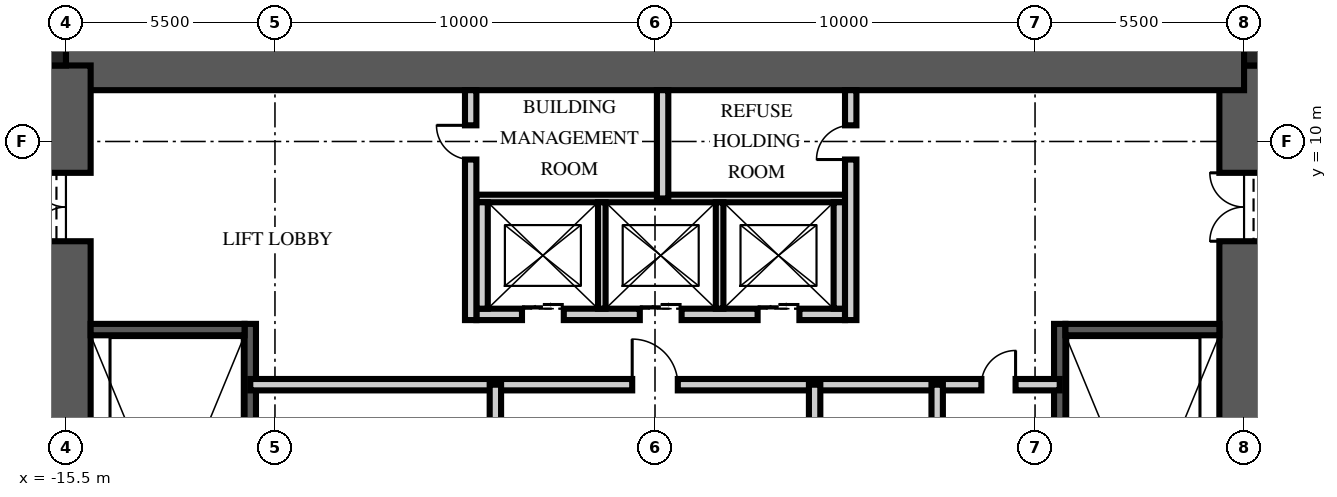
"""IFC4 building model, lengths in metres.
Left out: names, types, materials, properties, quantities, classifications, styles, units other than length and angle.
Written with IfcOpenShell. Run it as: python <this file> out.ifc"""

import sys

from ifc_helpers import new_model, si_unit, direction, frame, frame_2d, origin, origin_2d, place, context, subcontext, project, spatial, rectangle, extrude, element, fill, save


model = new_model("IFC4")
c1 = context("Model", 3, precision=1e-05, world=origin(), true_north=direction((0.0, 1.0)))
c2 = subcontext(c1, "Body", "Model", "MODEL_VIEW")
j1 = project(units=[si_unit("LENGTHUNIT", "METRE"), si_unit("PLANEANGLEUNIT", "RADIAN")], contexts=[c1])
p1 = place(None, origin())
s1 = spatial("IfcSite", under=j1, at=p1, CompositionType="ELEMENT")
p2 = place(p1, origin())
s2 = spatial("IfcBuilding", under=s1, at=p2, CompositionType="ELEMENT")
p3 = place(p2, frame((0.0, 0.0, 297.0)))
s3 = spatial("IfcBuildingStorey", under=s2, at=p3, CompositionType="ELEMENT", Elevation=297.0)
p4 = place(p3, frame((15.5, -12.0, -0.25), z_axis=(0.0, 0.0, 1.0), x_axis=(0.0, 1.0, 0.0)))
e1 = element("IfcWall", 1, at=p4, inside=s3, PredefinedType="SHEAR", context=c2, shape_type="SweptSolid", body=[
    extrude(rectangle(XDim=24.0, YDim=1.3, at=frame_2d((12.0, 0.0))), origin(), (0.0, 0.0, 1.0), 3.75),
])
p5 = place(p4, frame((3.125, 0.0, 0.25)))
e2 = element("IfcOpeningElement", 2, at=p5, cuts=e1, PredefinedType="OPENING", context=c2, shape_type="SweptSolid", body=[
    extrude(rectangle(XDim=1.2, YDim=2.1, at=frame_2d((0.6, 1.05))), frame((0.0, 0.66, 0.0), z_axis=(0.0, -1.0, 0.0), x_axis=(1.0, 0.0, 0.0)), (0.0, 0.0, 1.0), 1.32),
])
p6 = place(p4, frame((19.375, 0.0, 0.25)))
e3 = element("IfcOpeningElement", 3, at=p6, cuts=e1, PredefinedType="OPENING", context=c2, shape_type="SweptSolid", body=[
    extrude(rectangle(XDim=1.8, YDim=2.1, at=frame_2d((0.9, 1.05))), frame((0.0, 0.66, 0.0), z_axis=(0.0, -1.0, 0.0), x_axis=(1.0, 0.0, 0.0)), (0.0, 0.0, 1.0), 1.32),
])
p7 = place(p3, frame((-15.5, 12.0, -0.25), z_axis=(0.0, 0.0, 1.0), x_axis=(1.0, 0.0, 0.0)))
e4 = element("IfcWall", 4, at=p7, inside=s3, PredefinedType="SHEAR", context=c2, shape_type="SweptSolid", body=[
    extrude(rectangle(XDim=31.0, YDim=1.3, at=frame_2d((15.5, 0.0))), origin(), (0.0, 0.0, 1.0), 3.75),
])
p8 = place(p3, frame((-15.5, -12.0, -0.25), z_axis=(0.0, 0.0, 1.0), x_axis=(0.0, 1.0, 0.0)))
e5 = element("IfcWall", 5, at=p8, inside=s3, PredefinedType="SHEAR", context=c2, shape_type="SweptSolid", body=[
    extrude(rectangle(XDim=24.0, YDim=1.3, at=frame_2d((12.0, 0.0))), origin(), (0.0, 0.0, 1.0), 3.75),
])
p9 = place(p8, frame((3.125, 0.0, 0.25)))
e6 = element("IfcOpeningElement", 6, at=p9, cuts=e5, PredefinedType="OPENING", context=c2, shape_type="SweptSolid", body=[
    extrude(rectangle(XDim=1.2, YDim=2.1, at=frame_2d((0.6, 1.05))), frame((0.0, 0.66, 0.0), z_axis=(0.0, -1.0, 0.0), x_axis=(1.0, 0.0, 0.0)), (0.0, 0.0, 1.0), 1.32),
])
p10 = place(p8, frame((19.375, 0.0, 0.25)))
e7 = element("IfcOpeningElement", 7, at=p10, cuts=e5, PredefinedType="OPENING", context=c2, shape_type="SweptSolid", body=[
    extrude(rectangle(XDim=1.8, YDim=2.1, at=frame_2d((0.9, 1.05))), frame((0.0, 0.66, 0.0), z_axis=(0.0, -1.0, 0.0), x_axis=(1.0, 0.0, 0.0)), (0.0, 0.0, 1.0), 1.32),
])
for number, where, z_axis, x_axis in (
    (8, (15.825, 12.325, -0.25), (0.0, 0.0, 1.0), (1.0, 0.0, 0.0)),
    (9, (-15.825, 12.325, -0.25), (0.0, 0.0, 1.0), (1.0, 0.0, 0.0)),
):
    element("IfcColumn", number, at=place(p3, frame(where, z_axis=z_axis, x_axis=x_axis)), inside=s3, PredefinedType="COLUMN", context=c2, shape_type="SweptSolid", body=[
        extrude(rectangle(XDim=0.65, YDim=0.65, at=origin_2d()), origin(), (0.0, 0.0, 1.0), 3.75),
    ])
p11 = place(p3, frame((-10.65, -4.9, 0.0), z_axis=(0.0, 0.0, 1.0), x_axis=(0.0, 1.0, 0.0)))
e10 = element("IfcWall", 10, at=p11, inside=s3, PredefinedType="SOLIDWALL", context=c2, shape_type="SweptSolid", body=[
    extrude(rectangle(XDim=10.1, YDim=0.3, at=frame_2d((5.05, 0.0))), origin(), (0.0, 0.0, 1.0), 3.5),
])
p12 = place(p3, frame((-14.85, 5.05, 0.0), z_axis=(0.0, 0.0, 1.0), x_axis=(1.0, 0.0, 0.0)))
e11 = element("IfcWall", 11, at=p12, inside=s3, PredefinedType="SOLIDWALL", context=c2, shape_type="SweptSolid", body=[
    extrude(rectangle(XDim=4.05, YDim=0.3, at=frame_2d((2.025, 0.0))), origin(), (0.0, 0.0, 1.0), 3.5),
])
p13 = place(p3, frame((10.65, -4.9, 0.0), z_axis=(0.0, 0.0, 1.0), x_axis=(0.0, 1.0, 0.0)))
e12 = element("IfcWall", 12, at=p13, inside=s3, PredefinedType="SOLIDWALL", context=c2, shape_type="SweptSolid", body=[
    extrude(rectangle(XDim=10.1, YDim=0.3, at=frame_2d((5.05, 0.0))), origin(), (0.0, 0.0, 1.0), 3.5),
])
p14 = place(p3, frame((14.85, 5.05, 0.0), z_axis=(0.0, 0.0, 1.0), x_axis=(-1.0, 0.0, 0.0)))
e13 = element("IfcWall", 13, at=p14, inside=s3, PredefinedType="SOLIDWALL", context=c2, shape_type="SweptSolid", body=[
    extrude(rectangle(XDim=4.05, YDim=0.3, at=frame_2d((2.025, 0.0))), origin(), (0.0, 0.0, 1.0), 3.5),
])
p15 = place(p3, frame((-4.7, 5.45, 0.0), z_axis=(0.0, 0.0, 1.0), x_axis=(1.0, 0.0, 0.0)))
e14 = element("IfcWall", 14, at=p15, inside=s3, PredefinedType="PARTITIONING", context=c2, shape_type="SweptSolid", body=[
    extrude(rectangle(XDim=9.7, YDim=0.3, at=frame_2d((4.85, 0.0))), origin(), (0.0, 0.0, 1.0), 3.5),
])
p16 = place(p15, frame((1.2, 0.0, 0.0)))
e15 = element("IfcOpeningElement", 15, at=p16, cuts=e14, PredefinedType="OPENING", context=c2, shape_type="SweptSolid", body=[
    extrude(rectangle(XDim=1.1, YDim=2.1, at=frame_2d((0.55, 1.05))), frame((0.0, 0.16, 0.0), z_axis=(0.0, -1.0, 0.0), x_axis=(1.0, 0.0, 0.0)), (0.0, 0.0, 1.0), 0.32),
])
p17 = place(p15, frame((4.3, 0.0, 0.0)))
e16 = element("IfcOpeningElement", 16, at=p17, cuts=e14, PredefinedType="OPENING", context=c2, shape_type="SweptSolid", body=[
    extrude(rectangle(XDim=1.1, YDim=2.1, at=frame_2d((0.55, 1.05))), frame((0.0, 0.16, 0.0), z_axis=(0.0, -1.0, 0.0), x_axis=(1.0, 0.0, 0.0)), (0.0, 0.0, 1.0), 0.32),
])
p18 = place(p15, frame((7.4, 0.0, 0.0)))
e17 = element("IfcOpeningElement", 17, at=p18, cuts=e14, PredefinedType="OPENING", context=c2, shape_type="SweptSolid", body=[
    extrude(rectangle(XDim=1.1, YDim=2.1, at=frame_2d((0.55, 1.05))), frame((0.0, 0.16, 0.0), z_axis=(0.0, -1.0, 0.0), x_axis=(1.0, 0.0, 0.0)), (0.0, 0.0, 1.0), 0.32),
])
p19 = place(p3, frame((-4.7, 8.5, 0.0), z_axis=(0.0, 0.0, 1.0), x_axis=(1.0, 0.0, 0.0)))
e18 = element("IfcWall", 18, at=p19, inside=s3, PredefinedType="PARTITIONING", context=c2, shape_type="SweptSolid", body=[
    extrude(rectangle(XDim=9.7, YDim=0.2, at=frame_2d((4.85, 0.0))), origin(), (0.0, 0.0, 1.0), 3.5),
])
for number, where, z_axis, x_axis in (
    (19, (-4.55, 5.6, 0.0), (0.0, 0.0, 1.0), (0.0, 1.0, 0.0)),
    (20, (4.85, 5.6, 0.0), (0.0, 0.0, 1.0), (0.0, 1.0, 0.0)),
):
    element("IfcWall", number, at=place(p3, frame(where, z_axis=z_axis, x_axis=x_axis)), inside=s3, PredefinedType="PARTITIONING", context=c2, shape_type="SweptSolid", body=[
        extrude(rectangle(XDim=2.8, YDim=0.3, at=frame_2d((1.4, 0.0))), origin(), (0.0, 0.0, 1.0), 3.5),
    ])
for number, where, z_axis, x_axis in (
    (21, (-1.4, 5.6, 0.0), (0.0, 0.0, 1.0), (0.0, 1.0, 0.0)),
    (22, (1.7, 5.6, 0.0), (0.0, 0.0, 1.0), (0.0, 1.0, 0.0)),
):
    element("IfcWall", number, at=place(p3, frame(where, z_axis=z_axis, x_axis=x_axis)), inside=s3, PredefinedType="PARTITIONING", context=c2, shape_type="SweptSolid", body=[
        extrude(rectangle(XDim=2.8, YDim=0.2, at=frame_2d((1.4, 0.0))), origin(), (0.0, 0.0, 1.0), 3.5),
    ])
p20 = place(p3, frame((-10.65, 3.6, 0.0), z_axis=(0.0, 0.0, 1.0), x_axis=(1.0, 0.0, 0.0)))
e23 = element("IfcWall", 23, at=p20, inside=s3, PredefinedType="PARTITIONING", context=c2, shape_type="SweptSolid", body=[
    extrude(rectangle(XDim=21.3, YDim=0.3, at=frame_2d((10.65, 0.0))), origin(), (0.0, 0.0, 1.0), 3.5),
])
p21 = place(p20, frame((10.05, 0.0, 0.0)))
e24 = element("IfcOpeningElement", 24, at=p21, cuts=e23, PredefinedType="OPENING", context=c2, shape_type="SweptSolid", body=[
    extrude(rectangle(XDim=1.2, YDim=2.1, at=frame_2d((0.6, 1.05))), frame((0.0, 0.16, 0.0), z_axis=(0.0, -1.0, 0.0), x_axis=(1.0, 0.0, 0.0)), (0.0, 0.0, 1.0), 0.32),
])
p22 = place(p20, frame((19.238, 0.0, 0.0)))
e25 = element("IfcOpeningElement", 25, at=p22, cuts=e23, PredefinedType="OPENING", context=c2, shape_type="SweptSolid", body=[
    extrude(rectangle(XDim=0.9, YDim=2.1, at=frame_2d((0.45, 1.05))), frame((0.0, 0.16, 0.0), z_axis=(0.0, -1.0, 0.0), x_axis=(1.0, 0.0, 0.0)), (0.0, 0.0, 1.0), 0.32),
])
p23 = place(p3, frame((-4.2, -6.65, 0.0), z_axis=(0.0, 0.0, 1.0), x_axis=(0.0, 1.0, 0.0)))
e26 = element("IfcWall", 26, at=p23, inside=s3, PredefinedType="PARTITIONING", context=c2, shape_type="SweptSolid", body=[
    extrude(rectangle(XDim=10.25, YDim=0.3, at=frame_2d((5.125, 0.0))), origin(), (0.0, 0.0, 1.0), 3.5),
])
p24 = place(p23, frame((0.787, 0.0, 0.0)))
e27 = element("IfcOpeningElement", 27, at=p24, cuts=e26, PredefinedType="OPENING", context=c2, shape_type="SweptSolid", body=[
    extrude(rectangle(XDim=0.9, YDim=2.1, at=frame_2d((0.45, 1.05))), frame((0.0, 0.16, 0.0), z_axis=(0.0, -1.0, 0.0), x_axis=(1.0, 0.0, 0.0)), (0.0, 0.0, 1.0), 0.32),
])
p25 = place(p23, frame((5.912, 0.0, 0.0)))
e28 = element("IfcOpeningElement", 28, at=p25, cuts=e26, PredefinedType="OPENING", context=c2, shape_type="SweptSolid", body=[
    extrude(rectangle(XDim=0.9, YDim=2.1, at=frame_2d((0.45, 1.05))), frame((0.0, 0.16, 0.0), z_axis=(0.0, -1.0, 0.0), x_axis=(1.0, 0.0, 0.0)), (0.0, 0.0, 1.0), 0.32),
])
p26 = place(p3, frame((4.2, -6.65, 0.0), z_axis=(0.0, 0.0, 1.0), x_axis=(0.0, 1.0, 0.0)))
e29 = element("IfcWall", 29, at=p26, inside=s3, PredefinedType="PARTITIONING", context=c2, shape_type="SweptSolid", body=[
    extrude(rectangle(XDim=10.25, YDim=0.3, at=frame_2d((5.125, 0.0))), origin(), (0.0, 0.0, 1.0), 3.5),
])
p27 = place(p26, frame((2.15, 0.0, 0.0)))
e30 = element("IfcOpeningElement", 30, at=p27, cuts=e29, PredefinedType="OPENING", context=c2, shape_type="SweptSolid", body=[
    extrude(rectangle(XDim=0.9, YDim=2.1, at=frame_2d((0.45, 1.05))), frame((0.0, 0.16, 0.0), z_axis=(0.0, -1.0, 0.0), x_axis=(1.0, 0.0, 0.0)), (0.0, 0.0, 1.0), 0.32),
])
p28 = place(p26, frame((7.275, 0.0, 0.0)))
e31 = element("IfcOpeningElement", 31, at=p28, cuts=e29, PredefinedType="OPENING", context=c2, shape_type="SweptSolid", body=[
    extrude(rectangle(XDim=0.9, YDim=2.1, at=frame_2d((0.45, 1.05))), frame((0.0, 0.16, 0.0), z_axis=(0.0, -1.0, 0.0), x_axis=(1.0, 0.0, 0.0)), (0.0, 0.0, 1.0), 0.32),
])
p29 = place(p3, frame((7.425, -1.45, 0.0), z_axis=(0.0, 0.0, 1.0), x_axis=(0.0, 1.0, 0.0)))
e32 = element("IfcWall", 32, at=p29, inside=s3, PredefinedType="PARTITIONING", context=c2, shape_type="SweptSolid", body=[
    extrude(rectangle(XDim=5.05, YDim=0.3, at=frame_2d((2.525, 0.0))), origin(), (0.0, 0.0, 1.0), 3.5),
])
p30 = place(p3, frame((-4.85, 5.3, 0.0), z_axis=(0.0, 0.0, 1.0), x_axis=(0.0, 1.0, 0.0)))
e33 = element("IfcWall", 33, at=p30, inside=s3, PredefinedType="PARTITIONING", context=c2, shape_type="SweptSolid", body=[
    extrude(rectangle(XDim=6.05, YDim=0.3, at=frame_2d((3.025, 0.0))), origin(), (0.0, 0.0, 1.0), 3.5),
])
p31 = place(p30, frame((4.225, 0.0, 0.0)))
e34 = element("IfcOpeningElement", 34, at=p31, cuts=e33, PredefinedType="OPENING", context=c2, shape_type="SweptSolid", body=[
    extrude(rectangle(XDim=0.9, YDim=2.1, at=frame_2d((0.45, 1.05))), frame((0.0, 0.16, 0.0), z_axis=(0.0, -1.0, 0.0), x_axis=(1.0, 0.0, 0.0)), (0.0, 0.0, 1.0), 0.32),
])
p32 = place(p3, frame((5.15, 5.3, 0.0), z_axis=(0.0, 0.0, 1.0), x_axis=(0.0, 1.0, 0.0)))
e35 = element("IfcWall", 35, at=p32, inside=s3, PredefinedType="PARTITIONING", context=c2, shape_type="SweptSolid", body=[
    extrude(rectangle(XDim=6.05, YDim=0.3, at=frame_2d((3.025, 0.0))), origin(), (0.0, 0.0, 1.0), 3.5),
])
p33 = place(p32, frame((4.225, 0.0, 0.0)))
e36 = element("IfcOpeningElement", 36, at=p33, cuts=e35, PredefinedType="OPENING", context=c2, shape_type="SweptSolid", body=[
    extrude(rectangle(XDim=0.9, YDim=2.1, at=frame_2d((0.45, 1.05))), frame((0.0, 0.16, 0.0), z_axis=(0.0, -1.0, 0.0), x_axis=(1.0, 0.0, 0.0)), (0.0, 0.0, 1.0), 0.32),
])
p34 = place(p3, frame((0.2, 8.5, 0.0), z_axis=(0.0, 0.0, 1.0), x_axis=(0.0, 1.0, 0.0)))
e37 = element("IfcWall", 37, at=p34, inside=s3, PredefinedType="PARTITIONING", context=c2, shape_type="SweptSolid", body=[
    extrude(rectangle(XDim=2.85, YDim=0.3, at=frame_2d((1.425, 0.0))), origin(), (0.0, 0.0, 1.0), 3.5),
])
p35 = place(p10, origin())
e38 = element("IfcDoor", 38, at=p35, inside=s3, OperationType="DOUBLE_DOOR_SINGLE_SWING", PredefinedType="DOOR", context=c2, shape_type="SweptSolid", body=[
    extrude(rectangle(XDim=1.8, YDim=2.1, at=frame_2d((0.9, 1.05))), frame((0.0, 0.025, 0.0), z_axis=(0.0, -1.0, 0.0), x_axis=(1.0, 0.0, 0.0)), (0.0, 0.0, 1.0), 0.05),
])
fill(e7, e38)
p36 = place(p6, origin())
e39 = element("IfcDoor", 39, at=p36, inside=s3, OperationType="DOUBLE_DOOR_SINGLE_SWING", PredefinedType="DOOR", context=c2, shape_type="SweptSolid", body=[
    extrude(rectangle(XDim=1.8, YDim=2.1, at=frame_2d((0.9, 1.05))), frame((0.0, 0.025, 0.0), z_axis=(0.0, -1.0, 0.0), x_axis=(1.0, 0.0, 0.0)), (0.0, 0.0, 1.0), 0.05),
])
fill(e3, e39)
p37 = place(p16, origin())
e40 = element("IfcDoor", 40, at=p37, inside=s3, OperationType="DOUBLE_DOOR_SLIDING", PredefinedType="DOOR", context=c2, shape_type="SweptSolid", body=[
    extrude(rectangle(XDim=1.1, YDim=2.1, at=frame_2d((0.55, 1.05))), frame((0.0, 0.025, 0.0), z_axis=(0.0, -1.0, 0.0), x_axis=(1.0, 0.0, 0.0)), (0.0, 0.0, 1.0), 0.05),
])
fill(e15, e40)
p38 = place(p17, origin())
e41 = element("IfcDoor", 41, at=p38, inside=s3, OperationType="DOUBLE_DOOR_SLIDING", PredefinedType="DOOR", context=c2, shape_type="SweptSolid", body=[
    extrude(rectangle(XDim=1.1, YDim=2.1, at=frame_2d((0.55, 1.05))), frame((0.0, 0.025, 0.0), z_axis=(0.0, -1.0, 0.0), x_axis=(1.0, 0.0, 0.0)), (0.0, 0.0, 1.0), 0.05),
])
fill(e16, e41)
p39 = place(p18, origin())
e42 = element("IfcDoor", 42, at=p39, inside=s3, OperationType="DOUBLE_DOOR_SLIDING", PredefinedType="DOOR", context=c2, shape_type="SweptSolid", body=[
    extrude(rectangle(XDim=1.1, YDim=2.1, at=frame_2d((0.55, 1.05))), frame((0.0, 0.025, 0.0), z_axis=(0.0, -1.0, 0.0), x_axis=(1.0, 0.0, 0.0)), (0.0, 0.0, 1.0), 0.05),
])
fill(e17, e42)
p40 = place(p21, origin())
e43 = element("IfcDoor", 43, at=p40, inside=s3, OperationType="SINGLE_SWING_LEFT", PredefinedType="DOOR", context=c2, shape_type="SweptSolid", body=[
    extrude(rectangle(XDim=1.2, YDim=2.1, at=frame_2d((0.6, 1.05))), frame((0.0, 0.025, 0.0), z_axis=(0.0, -1.0, 0.0), x_axis=(1.0, 0.0, 0.0)), (0.0, 0.0, 1.0), 0.05),
])
fill(e24, e43)
p41 = place(p22, origin())
e44 = element("IfcDoor", 44, at=p41, inside=s3, OperationType="SINGLE_SWING_RIGHT", PredefinedType="DOOR", context=c2, shape_type="SweptSolid", body=[
    extrude(rectangle(XDim=0.9, YDim=2.1, at=frame_2d((0.45, 1.05))), frame((0.0, 0.025, 0.0), z_axis=(0.0, -1.0, 0.0), x_axis=(1.0, 0.0, 0.0)), (0.0, 0.0, 1.0), 0.05),
])
fill(e25, e44)
p42 = place(p31, origin())
e45 = element("IfcDoor", 45, at=p42, inside=s3, OperationType="SINGLE_SWING_RIGHT", PredefinedType="DOOR", context=c2, shape_type="SweptSolid", body=[
    extrude(rectangle(XDim=0.9, YDim=2.1, at=frame_2d((0.45, 1.05))), frame((0.0, 0.025, 0.0), z_axis=(0.0, -1.0, 0.0), x_axis=(1.0, 0.0, 0.0)), (0.0, 0.0, 1.0), 0.05),
])
fill(e34, e45)
p43 = place(p33, origin())
e46 = element("IfcDoor", 46, at=p43, inside=s3, OperationType="SINGLE_SWING_LEFT", PredefinedType="DOOR", context=c2, shape_type="SweptSolid", body=[
    extrude(rectangle(XDim=0.9, YDim=2.1, at=frame_2d((0.45, 1.05))), frame((0.0, 0.025, 0.0), z_axis=(0.0, -1.0, 0.0), x_axis=(1.0, 0.0, 0.0)), (0.0, 0.0, 1.0), 0.05),
])
fill(e36, e46)
save(model, sys.argv[1])
